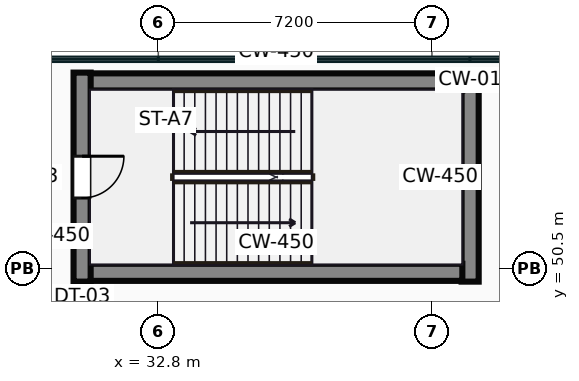
"""IFC4 building model, lengths in metres.
Left out: names, types, materials, properties, quantities, classifications, styles, units other than length and angle.
Written with IfcOpenShell. Run it as: python <this file> out.ifc"""

import sys

from ifc_helpers import new_model, si_unit, direction, frame, frame_2d, origin, place, context, subcontext, project, spatial, rectangle, extrude, source, transform, mapped, element, fill, save


model = new_model("IFC4")
c1 = context("Model", 3, precision=1e-05, world=origin(), true_north=direction((0.0, 1.0)))
c2 = subcontext(c1, "Body", "Model", "MODEL_VIEW")
j1 = project(units=[si_unit("LENGTHUNIT", "METRE"), si_unit("PLANEANGLEUNIT", "RADIAN")], contexts=[c1])
p1 = place(None, origin())
s1 = spatial("IfcSite", under=j1, at=p1, CompositionType="ELEMENT")
p2 = place(p1, origin())
s2 = spatial("IfcBuilding", under=s1, at=p2, CompositionType="ELEMENT")
p3 = place(p2, frame((0.0, 0.0, 6.0)))
s3 = spatial("IfcBuildingStorey", under=s2, at=p3, CompositionType="ELEMENT", Elevation=6.0)
m1 = source(origin(), c2, "Body", "SweptSolid", [
    extrude(rectangle(XDim=5.5, YDim=0.45, at=frame_2d((2.75, 0.0))), origin(), (0.0, 0.0, 1.0), 5.0),
])
p4 = place(p3, frame((30.795, 50.15, 0.0), z_axis=(0.0, 0.0, 1.0), x_axis=(0.0, 1.0, 0.0)))
e1 = element("IfcWall", 1, at=p4, inside=s3, PredefinedType="SHEAR", context=c2, shape_type="MappedRepresentation", body=[
    mapped(m1, transform((0.0, 0.0, 0.0))),
])
p5 = place(p4, frame((2.2, 0.0, 0.0)))
e2 = element("IfcOpeningElement", 2, at=p5, cuts=e1, PredefinedType="OPENING", context=c2, shape_type="SweptSolid", body=[
    extrude(rectangle(XDim=1.1, YDim=2.15, at=frame_2d((0.55, 1.075))), frame((0.0, 0.235, 0.0), z_axis=(0.0, -1.0, 0.0), x_axis=(1.0, 0.0, 0.0)), (0.0, 0.0, 1.0), 0.47),
])
m2 = source(origin(), c2, "Body", "SweptSolid", [
    extrude(rectangle(XDim=9.8, YDim=0.45, at=frame_2d((4.9, 0.0))), origin(), (0.0, 0.0, 1.0), 5.0),
])
for number, where, z_axis, x_axis in (
    (3, (31.0, 50.395, 0.0), (0.0, 0.0, 1.0), (1.0, 0.0, 0.0)),
    (4, (31.0, 55.405, 0.0), (0.0, 0.0, 1.0), (1.0, 0.0, 0.0)),
):
    element("IfcWall", number, at=place(p3, frame(where, z_axis=z_axis, x_axis=x_axis)), inside=s3, PredefinedType="SHEAR", context=c2, shape_type="MappedRepresentation", body=[
        mapped(m2, transform((0.0, 0.0, 0.0))),
    ])
p6 = place(p3, frame((41.005, 50.15, 0.0), z_axis=(0.0, 0.0, 1.0), x_axis=(0.0, 1.0, 0.0)))
e5 = element("IfcWall", 5, at=p6, inside=s3, PredefinedType="SHEAR", context=c2, shape_type="MappedRepresentation", body=[
    mapped(m1, transform((0.0, 0.0, 0.0))),
])
m3 = source(origin(), c2, "Body", "SweptSolid", [
    extrude(rectangle(XDim=1.1, YDim=2.15, at=frame_2d((0.55, 1.075))), frame((0.0, 0.025, 0.0), z_axis=(0.0, -1.0, 0.0), x_axis=(1.0, 0.0, 0.0)), (0.0, 0.0, 1.0), 0.05),
])
p7 = place(p5, frame((1.1, 0.0, 0.0), z_axis=(0.0, 0.0, 1.0), x_axis=(-1.0, 0.0, 0.0)))
e6 = element("IfcDoor", 6, at=p7, inside=s3, OperationType="SINGLE_SWING_RIGHT", PredefinedType="DOOR", context=c2, shape_type="MappedRepresentation", body=[
    mapped(m3, transform((0.0, 0.0, 0.0))),
])
fill(e2, e6)
save(model, sys.argv[1])
